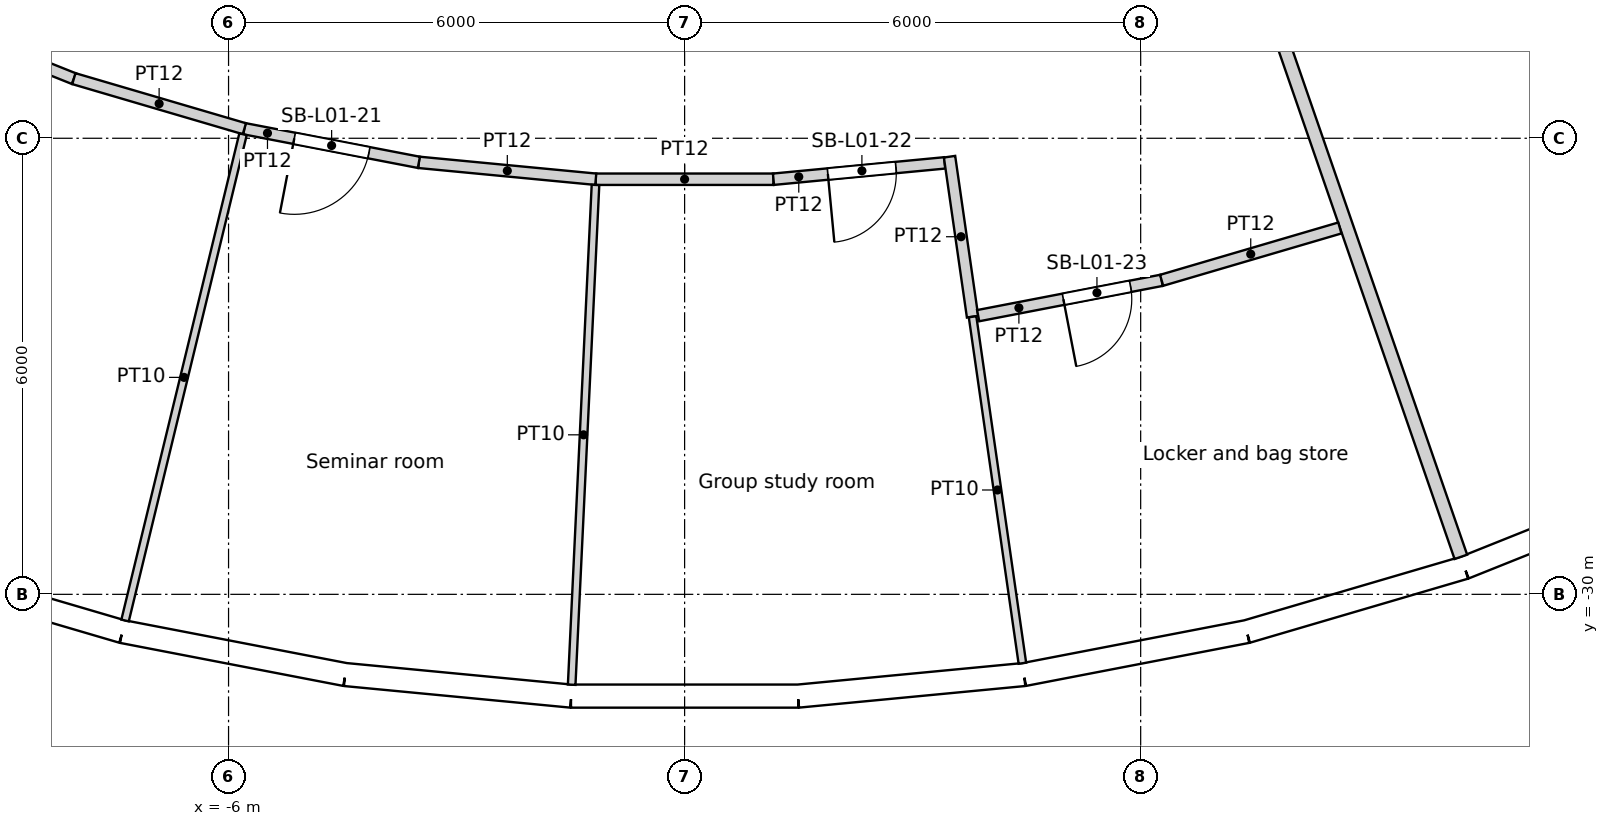
"""IFC4 building model, lengths in metres.
Left out: names, types, materials, properties, quantities, classifications, styles, units other than length and angle.
Written with IfcOpenShell. Run it as: python <this file> out.ifc"""

import sys

from ifc_helpers import new_model, si_unit, direction, frame, frame_2d, origin, origin_2d, place, context, subcontext, project, spatial, rectangle, circle, extrude, element, fill, save


model = new_model("IFC4")
c1 = context("Model", 3, precision=1e-05, world=origin(), true_north=direction((0.0, 1.0)))
c2 = subcontext(c1, "Body", "Model", "MODEL_VIEW")
j1 = project(units=[si_unit("LENGTHUNIT", "METRE"), si_unit("PLANEANGLEUNIT", "RADIAN")], contexts=[c1])
p1 = place(None, origin())
s1 = spatial("IfcSite", under=j1, at=p1, CompositionType="ELEMENT")
p2 = place(p1, origin())
s2 = spatial("IfcBuilding", under=s1, at=p2, CompositionType="ELEMENT")
p3 = place(p2, frame((0.0, 0.0, 9.0)))
s3 = spatial("IfcBuildingStorey", under=s2, at=p3, CompositionType="ELEMENT", Elevation=9.0)
for number, where, z_axis, x_axis in (
    (1, (-4.309, -29.966, 0.0), (0.0, 0.0, 1.0), (1.0, 0.0, 0.0)),
    (2, (1.44, -30.24, 0.0), (0.0, 0.0, 1.0), (1.0, 0.0, 0.0)),
    (3, (7.137, -29.421, 0.0), (0.0, 0.0, 1.0), (1.0, 0.0, 0.0)),
):
    element("IfcColumn", number, at=place(p3, frame(where, z_axis=z_axis, x_axis=x_axis)), inside=s3, PredefinedType="COLUMN", context=c2, shape_type="SweptSolid", body=[
        extrude(circle(Radius=0.7, at=origin_2d()), origin(), (0.0, 0.0, 1.0), 4.8),
    ])
for number, where, z_axis, x_axis in (
    (4, (-7.04, -23.516, 0.0), (0.0, 0.0, 1.0), (1.0, 0.0, 0.0)),
    (5, (-1.427, -24.506, 0.0), (0.0, 0.0, 1.0), (1.0, 0.0, 0.0)),
    (6, (4.263, -24.175, 0.0), (0.0, 0.0, 1.0), (1.0, 0.0, 0.0)),
    (7, (9.723, -22.54, 0.0), (0.0, 0.0, 1.0), (1.0, 0.0, 0.0)),
):
    element("IfcColumn", number, at=place(p3, frame(where, z_axis=z_axis, x_axis=x_axis)), inside=s3, PredefinedType="COLUMN", context=c2, shape_type="SweptSolid", body=[
        extrude(circle(Radius=0.75, at=origin_2d()), origin(), (0.0, 0.0, 1.0), 4.8),
    ])
p4 = place(p3, frame((-10.261, -29.649, 0.0), z_axis=(0.0, 0.0, 1.0), x_axis=(0.959502108153, -0.281701445593, 0.0)))
e8 = element("IfcWall", 8, at=p4, inside=s3, PredefinedType="SOLIDWALL", context=c2, shape_type="SweptSolid", body=[
    extrude(rectangle(XDim=2.986, YDim=0.3, at=frame_2d((1.493, 0.0))), origin(), (0.0, 0.0, 1.0), 4.35),
])
p5 = place(p4, frame((1.493, 0.0, 2.0)))
e9 = element("IfcOpeningElement", 9, at=p5, cuts=e8, PredefinedType="OPENING", context=c2, shape_type="SweptSolid", body=[
    extrude(circle(Radius=1.2, at=origin_2d()), frame((0.0, 0.16, 0.0), z_axis=(0.0, -1.0, 0.0), x_axis=(1.0, 0.0, 0.0)), (0.0, 0.0, 1.0), 0.32),
])
p6 = place(p3, frame((-7.397, -30.49, 0.0), z_axis=(0.0, 0.0, 1.0), x_axis=(0.981918853666, -0.189302310646, 0.0)))
e10 = element("IfcWall", 10, at=p6, inside=s3, PredefinedType="SOLIDWALL", context=c2, shape_type="SweptSolid", body=[
    extrude(rectangle(XDim=2.986, YDim=0.3, at=frame_2d((1.493, 0.0))), origin(), (0.0, 0.0, 1.0), 4.35),
])
p7 = place(p6, frame((1.493, 0.0, 2.0)))
e11 = element("IfcOpeningElement", 11, at=p7, cuts=e10, PredefinedType="OPENING", context=c2, shape_type="SweptSolid", body=[
    extrude(circle(Radius=1.2, at=origin_2d()), frame((0.0, 0.16, 0.0), z_axis=(0.0, -1.0, 0.0), x_axis=(1.0, 0.0, 0.0)), (0.0, 0.0, 1.0), 0.32),
])
p8 = place(p3, frame((-4.465, -31.055, 0.0), z_axis=(0.0, 0.0, 1.0), x_axis=(0.99547560533, -0.095017467833, 0.0)))
e12 = element("IfcWall", 12, at=p8, inside=s3, PredefinedType="SOLIDWALL", context=c2, shape_type="SweptSolid", body=[
    extrude(rectangle(XDim=2.986, YDim=0.3, at=frame_2d((1.493, 0.0))), origin(), (0.0, 0.0, 1.0), 4.35),
])
p9 = place(p8, frame((1.493, 0.0, 2.0)))
e13 = element("IfcOpeningElement", 13, at=p9, cuts=e12, PredefinedType="OPENING", context=c2, shape_type="SweptSolid", body=[
    extrude(circle(Radius=1.2, at=origin_2d()), frame((0.0, 0.16, 0.0), z_axis=(0.0, -1.0, 0.0), x_axis=(1.0, 0.0, 0.0)), (0.0, 0.0, 1.0), 0.32),
])
p10 = place(p3, frame((-1.493, -31.339, 0.0), z_axis=(0.0, 0.0, 1.0), x_axis=(1.0, 0.0, 0.0)))
e14 = element("IfcWall", 14, at=p10, inside=s3, PredefinedType="SOLIDWALL", context=c2, shape_type="SweptSolid", body=[
    extrude(rectangle(XDim=2.986, YDim=0.3, at=frame_2d((1.493, 0.0))), origin(), (0.0, 0.0, 1.0), 4.35),
])
p11 = place(p10, frame((1.493, 0.0, 2.0)))
e15 = element("IfcOpeningElement", 15, at=p11, cuts=e14, PredefinedType="OPENING", context=c2, shape_type="SweptSolid", body=[
    extrude(circle(Radius=1.2, at=origin_2d()), frame((0.0, 0.16, 0.0), z_axis=(0.0, -1.0, 0.0), x_axis=(1.0, 0.0, 0.0)), (0.0, 0.0, 1.0), 0.32),
])
p12 = place(p3, frame((1.493, -31.339, 0.0), z_axis=(0.0, 0.0, 1.0), x_axis=(0.99547560533, 0.095017467833, 0.0)))
e16 = element("IfcWall", 16, at=p12, inside=s3, PredefinedType="SOLIDWALL", context=c2, shape_type="SweptSolid", body=[
    extrude(rectangle(XDim=2.986, YDim=0.3, at=frame_2d((1.493, 0.0))), origin(), (0.0, 0.0, 1.0), 4.35),
])
p13 = place(p12, frame((1.493, 0.0, 2.0)))
e17 = element("IfcOpeningElement", 17, at=p13, cuts=e16, PredefinedType="OPENING", context=c2, shape_type="SweptSolid", body=[
    extrude(circle(Radius=1.2, at=origin_2d()), frame((0.0, 0.16, 0.0), z_axis=(0.0, -1.0, 0.0), x_axis=(1.0, 0.0, 0.0)), (0.0, 0.0, 1.0), 0.32),
])
p14 = place(p3, frame((4.465, -31.055, 0.0), z_axis=(0.0, 0.0, 1.0), x_axis=(0.981918853666, 0.189302310646, 0.0)))
e18 = element("IfcWall", 18, at=p14, inside=s3, PredefinedType="SOLIDWALL", context=c2, shape_type="SweptSolid", body=[
    extrude(rectangle(XDim=2.986, YDim=0.3, at=frame_2d((1.493, 0.0))), origin(), (0.0, 0.0, 1.0), 4.35),
])
p15 = place(p14, frame((1.493, 0.0, 2.0)))
e19 = element("IfcOpeningElement", 19, at=p15, cuts=e18, PredefinedType="OPENING", context=c2, shape_type="SweptSolid", body=[
    extrude(circle(Radius=1.2, at=origin_2d()), frame((0.0, 0.16, 0.0), z_axis=(0.0, -1.0, 0.0), x_axis=(1.0, 0.0, 0.0)), (0.0, 0.0, 1.0), 0.32),
])
p16 = place(p3, frame((7.397, -30.49, 0.0), z_axis=(0.0, 0.0, 1.0), x_axis=(0.959502108153, 0.281701445593, 0.0)))
e20 = element("IfcWall", 20, at=p16, inside=s3, PredefinedType="SOLIDWALL", context=c2, shape_type="SweptSolid", body=[
    extrude(rectangle(XDim=2.986, YDim=0.3, at=frame_2d((1.493, 0.0))), origin(), (0.0, 0.0, 1.0), 4.35),
])
p17 = place(p16, frame((1.493, 0.0, 2.0)))
e21 = element("IfcOpeningElement", 21, at=p17, cuts=e20, PredefinedType="OPENING", context=c2, shape_type="SweptSolid", body=[
    extrude(circle(Radius=1.2, at=origin_2d()), frame((0.0, 0.16, 0.0), z_axis=(0.0, -1.0, 0.0), x_axis=(1.0, 0.0, 0.0)), (0.0, 0.0, 1.0), 0.32),
])
p18 = place(p3, frame((10.261, -29.649, 0.0), z_axis=(0.0, 0.0, 1.0), x_axis=(0.928380795373, 0.371630325434, 0.0)))
e22 = element("IfcWall", 22, at=p18, inside=s3, PredefinedType="SOLIDWALL", context=c2, shape_type="SweptSolid", body=[
    extrude(rectangle(XDim=2.986, YDim=0.3, at=frame_2d((1.493, 0.0))), origin(), (0.0, 0.0, 1.0), 4.35),
])
p19 = place(p18, frame((1.493, 0.0, 2.0)))
e23 = element("IfcOpeningElement", 23, at=p19, cuts=e22, PredefinedType="OPENING", context=c2, shape_type="SweptSolid", body=[
    extrude(circle(Radius=1.2, at=origin_2d()), frame((0.0, 0.16, 0.0), z_axis=(0.0, -1.0, 0.0), x_axis=(1.0, 0.0, 0.0)), (0.0, 0.0, 1.0), 0.32),
])
p20 = place(p3, frame((-8.035, -23.216, 0.0), z_axis=(0.0, 0.0, 1.0), x_axis=(-0.92836862221, 0.371660734133, 0.0)))
e24 = element("IfcWall", 24, at=p20, inside=s3, PredefinedType="PARTITIONING", context=c2, shape_type="SweptSolid", body=[
    extrude(rectangle(XDim=2.338, YDim=0.15, at=frame_2d((1.169, 0.0))), origin(), (0.0, 0.0, 1.0), 3.75),
])
p21 = place(p20, frame((0.669, 0.0, 0.0)))
e25 = element("IfcOpeningElement", 25, at=p21, cuts=e24, PredefinedType="OPENING", context=c2, shape_type="SweptSolid", body=[
    extrude(rectangle(XDim=1.0, YDim=2.1, at=frame_2d((0.5, 1.05))), frame((0.0, 0.075, 0.0), z_axis=(0.0, -1.0, 0.0), x_axis=(1.0, 0.0, 0.0)), (0.0, 0.0, 1.0), 0.15),
])
p22 = place(p3, frame((-8.035, -23.216, 0.0), z_axis=(0.0, 0.0, 1.0), x_axis=(0.959488462959, -0.28174791827, 0.0)))
e26 = element("IfcWall", 26, at=p22, inside=s3, PredefinedType="PARTITIONING", context=c2, shape_type="SweptSolid", body=[
    extrude(rectangle(XDim=2.338, YDim=0.15, at=frame_2d((1.169, 0.0))), origin(), (0.0, 0.0, 1.0), 3.75),
])
p23 = place(p3, frame((-7.361, -30.344, 0.0), z_axis=(0.0, 0.0, 1.0), x_axis=(0.235748643115, 0.971814065174, 0.0)))
e27 = element("IfcWall", 27, at=p23, inside=s3, PredefinedType="PARTITIONING", context=c2, shape_type="SweptSolid", body=[
    extrude(rectangle(XDim=6.582, YDim=0.1, at=frame_2d((3.291, 0.0))), origin(), (0.0, 0.0, 1.0), 3.75),
])
p24 = place(p3, frame((-3.496, -24.317, 0.0), z_axis=(0.0, 0.0, 1.0), x_axis=(-0.981934124814, 0.189223081374, 0.0)))
e28 = element("IfcWall", 28, at=p24, inside=s3, PredefinedType="PARTITIONING", context=c2, shape_type="SweptSolid", body=[
    extrude(rectangle(XDim=2.338, YDim=0.15, at=frame_2d((1.169, 0.0))), origin(), (0.0, 0.0, 1.0), 3.75),
])
p25 = place(p24, frame((0.669, 0.0, 0.0)))
e29 = element("IfcOpeningElement", 29, at=p25, cuts=e28, PredefinedType="OPENING", context=c2, shape_type="SweptSolid", body=[
    extrude(rectangle(XDim=1.0, YDim=2.1, at=frame_2d((0.5, 1.05))), frame((0.0, 0.075, 0.0), z_axis=(0.0, -1.0, 0.0), x_axis=(1.0, 0.0, 0.0)), (0.0, 0.0, 1.0), 0.15),
])
p26 = place(p3, frame((-3.496, -24.317, 0.0), z_axis=(0.0, 0.0, 1.0), x_axis=(0.995473855736, -0.095035796131, 0.0)))
e30 = element("IfcWall", 30, at=p26, inside=s3, PredefinedType="PARTITIONING", context=c2, shape_type="SweptSolid", body=[
    extrude(rectangle(XDim=2.338, YDim=0.15, at=frame_2d((1.169, 0.0))), origin(), (0.0, 0.0, 1.0), 3.75),
])
p27 = place(p3, frame((-1.486, -31.189, 0.0), z_axis=(0.0, 0.0, 1.0), x_axis=(0.047549289688, 0.998868892823, 0.0)))
e31 = element("IfcWall", 31, at=p27, inside=s3, PredefinedType="PARTITIONING", context=c2, shape_type="SweptSolid", body=[
    extrude(rectangle(XDim=6.582, YDim=0.1, at=frame_2d((3.291, 0.0))), origin(), (0.0, 0.0, 1.0), 3.75),
])
p28 = place(p3, frame((-1.169, -24.539, 0.0), z_axis=(0.0, 0.0, 1.0), x_axis=(1.0, 0.0, 0.0)))
e32 = element("IfcWall", 32, at=p28, inside=s3, PredefinedType="PARTITIONING", context=c2, shape_type="SweptSolid", body=[
    extrude(rectangle(XDim=2.338, YDim=0.15, at=frame_2d((1.169, 0.0))), origin(), (0.0, 0.0, 1.0), 3.75),
])
p29 = place(p3, frame((3.421, -24.324, 0.0), z_axis=(0.0, 0.0, 1.0), x_axis=(-0.995471679408, -0.095058589807, 0.0)))
e33 = element("IfcWall", 33, at=p29, inside=s3, PredefinedType="PARTITIONING", context=c2, shape_type="SweptSolid", body=[
    extrude(rectangle(XDim=2.263, YDim=0.15, at=frame_2d((1.131, 0.0))), origin(), (0.0, 0.0, 1.0), 3.75),
])
p30 = place(p29, frame((0.644, 0.0, 0.0)))
e34 = element("IfcOpeningElement", 34, at=p30, cuts=e33, PredefinedType="OPENING", context=c2, shape_type="SweptSolid", body=[
    extrude(rectangle(XDim=0.9, YDim=2.1, at=frame_2d((0.45, 1.05))), frame((0.0, 0.075, 0.0), z_axis=(0.0, -1.0, 0.0), x_axis=(1.0, 0.0, 0.0)), (0.0, 0.0, 1.0), 0.15),
])
p31 = place(p3, frame((3.788, -26.348, 0.0), z_axis=(0.0, 0.0, 1.0), x_axis=(-0.14230496784, 0.989822860985, 0.0)))
e35 = element("IfcWall", 35, at=p31, inside=s3, PredefinedType="PARTITIONING", context=c2, shape_type="SweptSolid", body=[
    extrude(rectangle(XDim=2.127, YDim=0.15, at=frame_2d((1.064, 0.0))), origin(), (0.0, 0.0, 1.0), 3.75),
])
p32 = place(p3, frame((6.276, -25.869, 0.0), z_axis=(0.0, 0.0, 1.0), x_axis=(-0.981917073198, -0.189311545773, 0.0)))
e36 = element("IfcWall", 36, at=p32, inside=s3, PredefinedType="PARTITIONING", context=c2, shape_type="SweptSolid", body=[
    extrude(rectangle(XDim=2.458, YDim=0.15, at=frame_2d((1.229, 0.0))), origin(), (0.0, 0.0, 1.0), 3.75),
])
p33 = place(p32, frame((0.417, 0.0, 0.0)))
e37 = element("IfcOpeningElement", 37, at=p33, cuts=e36, PredefinedType="OPENING", context=c2, shape_type="SweptSolid", body=[
    extrude(rectangle(XDim=0.9, YDim=2.1, at=frame_2d((0.45, 1.05))), frame((0.0, 0.075, 0.0), z_axis=(0.0, -1.0, 0.0), x_axis=(1.0, 0.0, 0.0)), (0.0, 0.0, 1.0), 0.15),
])
p34 = place(p3, frame((4.444, -30.906, 0.0), z_axis=(0.0, 0.0, 1.0), x_axis=(-0.142289671733, 0.989825059957, 0.0)))
e38 = element("IfcWall", 38, at=p34, inside=s3, PredefinedType="PARTITIONING", context=c2, shape_type="SweptSolid", body=[
    extrude(rectangle(XDim=4.605, YDim=0.1, at=frame_2d((2.303, 0.0))), origin(), (0.0, 0.0, 1.0), 3.75),
])
p35 = place(p3, frame((6.276, -25.869, 0.0), z_axis=(0.0, 0.0, 1.0), x_axis=(0.959492672172, 0.281733583457, 0.0)))
e39 = element("IfcWall", 39, at=p35, inside=s3, PredefinedType="PARTITIONING", context=c2, shape_type="SweptSolid", body=[
    extrude(rectangle(XDim=2.444, YDim=0.15, at=frame_2d((1.222, 0.0))), origin(), (0.0, 0.0, 1.0), 3.75),
])
p36 = place(p3, frame((10.212, -29.507, 0.0), z_axis=(0.0, 0.0, 1.0), x_axis=(-0.327058221259, 0.945004190418, 0.0)))
e40 = element("IfcWall", 40, at=p36, inside=s3, PredefinedType="PARTITIONING", context=c2, shape_type="SweptSolid", body=[
    extrude(rectangle(XDim=18.103, YDim=0.175, at=frame_2d((9.051, 0.0))), origin(), (0.0, 0.0, 1.0), 3.75),
])
p37 = place(p5, origin())
e41 = element("IfcWindow", 41, at=p37, inside=s3, PartitioningType="SINGLE_PANEL", PredefinedType="WINDOW", context=c2, shape_type="SweptSolid", body=[
    extrude(circle(Radius=1.2, at=origin_2d()), frame((0.0, 0.12, 0.0), z_axis=(0.0, -1.0, 0.0), x_axis=(1.0, 0.0, 0.0)), (0.0, 0.0, 1.0), 0.1),
])
fill(e9, e41)
p38 = place(p7, origin())
e42 = element("IfcWindow", 42, at=p38, inside=s3, PartitioningType="SINGLE_PANEL", PredefinedType="WINDOW", context=c2, shape_type="SweptSolid", body=[
    extrude(circle(Radius=1.2, at=origin_2d()), frame((0.0, 0.12, 0.0), z_axis=(0.0, -1.0, 0.0), x_axis=(1.0, 0.0, 0.0)), (0.0, 0.0, 1.0), 0.1),
])
fill(e11, e42)
p39 = place(p9, origin())
e43 = element("IfcWindow", 43, at=p39, inside=s3, PartitioningType="SINGLE_PANEL", PredefinedType="WINDOW", context=c2, shape_type="SweptSolid", body=[
    extrude(circle(Radius=1.2, at=origin_2d()), frame((0.0, 0.12, 0.0), z_axis=(0.0, -1.0, 0.0), x_axis=(1.0, 0.0, 0.0)), (0.0, 0.0, 1.0), 0.1),
])
fill(e13, e43)
p40 = place(p11, origin())
e44 = element("IfcWindow", 44, at=p40, inside=s3, PartitioningType="SINGLE_PANEL", PredefinedType="WINDOW", context=c2, shape_type="SweptSolid", body=[
    extrude(circle(Radius=1.2, at=origin_2d()), frame((0.0, 0.12, 0.0), z_axis=(0.0, -1.0, 0.0), x_axis=(1.0, 0.0, 0.0)), (0.0, 0.0, 1.0), 0.1),
])
fill(e15, e44)
p41 = place(p13, origin())
e45 = element("IfcWindow", 45, at=p41, inside=s3, PartitioningType="SINGLE_PANEL", PredefinedType="WINDOW", context=c2, shape_type="SweptSolid", body=[
    extrude(circle(Radius=1.2, at=origin_2d()), frame((0.0, 0.12, 0.0), z_axis=(0.0, -1.0, 0.0), x_axis=(1.0, 0.0, 0.0)), (0.0, 0.0, 1.0), 0.1),
])
fill(e17, e45)
p42 = place(p15, origin())
e46 = element("IfcWindow", 46, at=p42, inside=s3, PartitioningType="SINGLE_PANEL", PredefinedType="WINDOW", context=c2, shape_type="SweptSolid", body=[
    extrude(circle(Radius=1.2, at=origin_2d()), frame((0.0, 0.12, 0.0), z_axis=(0.0, -1.0, 0.0), x_axis=(1.0, 0.0, 0.0)), (0.0, 0.0, 1.0), 0.1),
])
fill(e19, e46)
p43 = place(p17, origin())
e47 = element("IfcWindow", 47, at=p43, inside=s3, PartitioningType="SINGLE_PANEL", PredefinedType="WINDOW", context=c2, shape_type="SweptSolid", body=[
    extrude(circle(Radius=1.2, at=origin_2d()), frame((0.0, 0.12, 0.0), z_axis=(0.0, -1.0, 0.0), x_axis=(1.0, 0.0, 0.0)), (0.0, 0.0, 1.0), 0.1),
])
fill(e21, e47)
p44 = place(p19, origin())
e48 = element("IfcWindow", 48, at=p44, inside=s3, PartitioningType="SINGLE_PANEL", PredefinedType="WINDOW", context=c2, shape_type="SweptSolid", body=[
    extrude(circle(Radius=1.2, at=origin_2d()), frame((0.0, 0.12, 0.0), z_axis=(0.0, -1.0, 0.0), x_axis=(1.0, 0.0, 0.0)), (0.0, 0.0, 1.0), 0.1),
])
fill(e23, e48)
p45 = place(p25, origin())
e49 = element("IfcDoor", 49, at=p45, inside=s3, OperationType="SINGLE_SWING_RIGHT", PredefinedType="DOOR", context=c2, shape_type="SweptSolid", body=[
    extrude(rectangle(XDim=1.0, YDim=2.1, at=frame_2d((0.5, 1.05))), frame((0.0, 0.025, 0.0), z_axis=(0.0, -1.0, 0.0), x_axis=(1.0, 0.0, 0.0)), (0.0, 0.0, 1.0), 0.05),
])
fill(e29, e49)
p46 = place(p30, origin())
e50 = element("IfcDoor", 50, at=p46, inside=s3, OperationType="SINGLE_SWING_RIGHT", PredefinedType="DOOR", context=c2, shape_type="SweptSolid", body=[
    extrude(rectangle(XDim=0.9, YDim=2.1, at=frame_2d((0.45, 1.05))), frame((0.0, 0.025, 0.0), z_axis=(0.0, -1.0, 0.0), x_axis=(1.0, 0.0, 0.0)), (0.0, 0.0, 1.0), 0.05),
])
fill(e34, e50)
p47 = place(p33, origin())
e51 = element("IfcDoor", 51, at=p47, inside=s3, OperationType="SINGLE_SWING_RIGHT", PredefinedType="DOOR", context=c2, shape_type="SweptSolid", body=[
    extrude(rectangle(XDim=0.9, YDim=2.1, at=frame_2d((0.45, 1.05))), frame((0.0, 0.025, 0.0), z_axis=(0.0, -1.0, 0.0), x_axis=(1.0, 0.0, 0.0)), (0.0, 0.0, 1.0), 0.05),
])
fill(e37, e51)
save(model, sys.argv[1])
